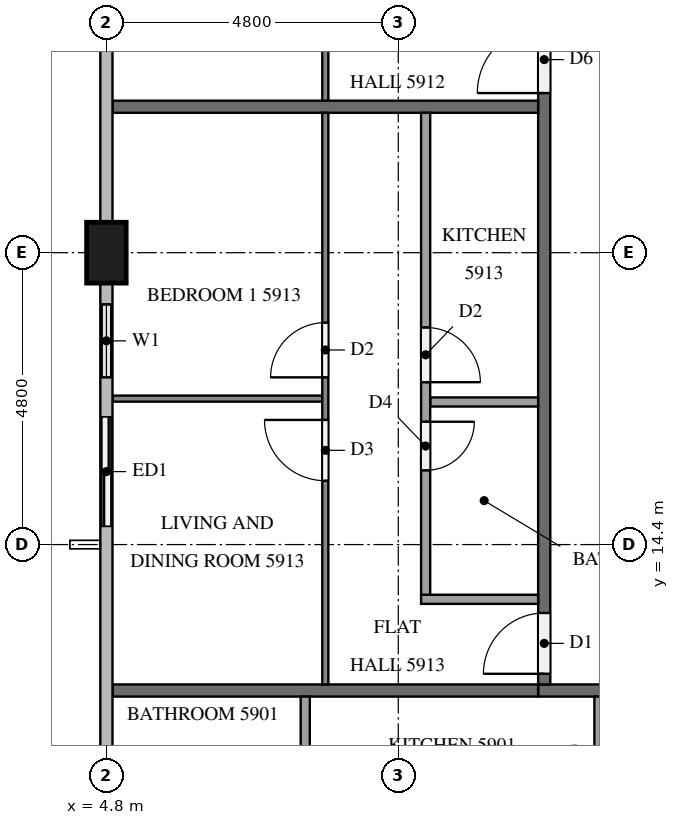
"""IFC4 building model, lengths in metres.
Left out: names, types, materials, properties, quantities, classifications, styles, units other than length and angle.
Written with IfcOpenShell. Run it as: python <this file> out.ifc"""

import sys

from ifc_helpers import new_model, si_unit, direction, frame, frame_2d, origin, origin_2d, place, context, subcontext, project, spatial, rectangle, extrude, element, fill, save


model = new_model("IFC4")
c1 = context("Model", 3, precision=1e-05, world=origin(), true_north=direction((0.0, 1.0)))
c2 = subcontext(c1, "Body", "Model", "MODEL_VIEW")
j1 = project(units=[si_unit("LENGTHUNIT", "METRE"), si_unit("PLANEANGLEUNIT", "RADIAN")], contexts=[c1])
p1 = place(None, origin())
s1 = spatial("IfcSite", under=j1, at=p1, CompositionType="ELEMENT")
p2 = place(p1, origin())
s2 = spatial("IfcBuilding", under=s1, at=p2, CompositionType="ELEMENT")
p3 = place(p2, frame((0.0, 0.0, 226.3)))
s3 = spatial("IfcBuildingStorey", under=s2, at=p3, CompositionType="ELEMENT", Elevation=226.3)
p4 = place(p3, frame((4.8, 19.2, 0.0), z_axis=(0.0, 0.0, 1.0), x_axis=(0.0, 1.0, 0.0)))
e1 = element("IfcColumn", 1, at=p4, inside=s3, PredefinedType="COLUMN", context=c2, shape_type="SweptSolid", body=[
    extrude(rectangle(XDim=1.0, YDim=0.65, at=origin_2d()), origin(), (0.0, 0.0, 1.0), 3.2),
])
p5 = place(p3, frame((4.8, 18.7, 0.0), z_axis=(0.0, 0.0, 1.0), x_axis=(0.0, -1.0, 0.0)))
e2 = element("IfcWall", 2, at=p5, inside=s3, PredefinedType="SOLIDWALL", context=c2, shape_type="SweptSolid", body=[
    extrude(rectangle(XDim=4.3, YDim=0.15, at=frame_2d((2.15, 0.0))), origin(), (0.0, 0.0, 1.0), 3.2),
])
p6 = place(p5, frame((0.35, 0.0, 0.9)))
e3 = element("IfcOpeningElement", 3, at=p6, cuts=e2, PredefinedType="OPENING", context=c2, shape_type="SweptSolid", body=[
    extrude(rectangle(XDim=1.2, YDim=1.4, at=frame_2d((0.6, 0.7))), frame((0.0, 0.085, 0.0), z_axis=(0.0, -1.0, 0.0), x_axis=(1.0, 0.0, 0.0)), (0.0, 0.0, 1.0), 0.17),
])
p7 = place(p5, frame((2.2, 0.0, 0.0)))
e4 = element("IfcOpeningElement", 4, at=p7, cuts=e2, PredefinedType="OPENING", context=c2, shape_type="SweptSolid", body=[
    extrude(rectangle(XDim=1.8, YDim=2.4, at=frame_2d((0.9, 1.2))), frame((0.0, 0.085, 0.0), z_axis=(0.0, -1.0, 0.0), x_axis=(1.0, 0.0, 0.0)), (0.0, 0.0, 1.0), 0.17),
])
p8 = place(p3, frame((50.5, 12.0, 0.0), z_axis=(0.0, 0.0, 1.0), x_axis=(-1.0, 0.0, 0.0)))
e5 = element("IfcWall", 5, at=p8, inside=s3, PredefinedType="PARTITIONING", context=c2, shape_type="SweptSolid", body=[
    extrude(rectangle(XDim=38.6, YDim=0.2, at=frame_2d((19.3, 0.0))), origin(), (0.0, 0.0, 1.0), 3.2),
])
p9 = place(p8, frame((36.375, 0.0, 0.0)))
e6 = element("IfcOpeningElement", 6, at=p9, cuts=e5, PredefinedType="OPENING", context=c2, shape_type="SweptSolid", body=[
    extrude(rectangle(XDim=1.0, YDim=2.1, at=frame_2d((0.5, 1.05))), frame((0.0, 0.11, 0.0), z_axis=(0.0, -1.0, 0.0), x_axis=(1.0, 0.0, 0.0)), (0.0, 0.0, 1.0), 0.22),
])
p10 = place(p8, frame((34.825, 0.0, 0.0)))
e7 = element("IfcOpeningElement", 7, at=p10, cuts=e5, PredefinedType="OPENING", context=c2, shape_type="SweptSolid", body=[
    extrude(rectangle(XDim=1.0, YDim=2.1, at=frame_2d((0.5, 1.05))), frame((0.0, 0.11, 0.0), z_axis=(0.0, -1.0, 0.0), x_axis=(1.0, 0.0, 0.0)), (0.0, 0.0, 1.0), 0.22),
])
p11 = place(p8, frame((20.375, 0.0, 0.0)))
e8 = element("IfcOpeningElement", 8, at=p11, cuts=e5, PredefinedType="OPENING", context=c2, shape_type="SweptSolid", body=[
    extrude(rectangle(XDim=1.1, YDim=2.1, at=frame_2d((0.55, 1.05))), frame((0.0, 0.11, 0.0), z_axis=(0.0, -1.0, 0.0), x_axis=(1.0, 0.0, 0.0)), (0.0, 0.0, 1.0), 0.22),
])
p12 = place(p8, frame((1.225, 0.0, 0.0)))
e9 = element("IfcOpeningElement", 9, at=p12, cuts=e5, PredefinedType="OPENING", context=c2, shape_type="SweptSolid", body=[
    extrude(rectangle(XDim=1.0, YDim=2.1, at=frame_2d((0.5, 1.05))), frame((0.0, 0.11, 0.0), z_axis=(0.0, -1.0, 0.0), x_axis=(1.0, 0.0, 0.0)), (0.0, 0.0, 1.0), 0.22),
])
p13 = place(p3, frame((12.0, 12.1, 0.0), z_axis=(0.0, 0.0, 1.0), x_axis=(0.0, 1.0, 0.0)))
e10 = element("IfcWall", 10, at=p13, inside=s3, PredefinedType="PARTITIONING", context=c2, shape_type="SweptSolid", body=[
    extrude(rectangle(XDim=28.6, YDim=0.2, at=frame_2d((14.3, 0.0))), origin(), (0.0, 0.0, 1.0), 3.2),
])
p14 = place(p13, frame((9.725, 0.0, 0.0)))
e11 = element("IfcOpeningElement", 11, at=p14, cuts=e10, PredefinedType="OPENING", context=c2, shape_type="SweptSolid", body=[
    extrude(rectangle(XDim=1.1, YDim=2.1, at=frame_2d((0.55, 1.05))), frame((0.0, 0.11, 0.0), z_axis=(0.0, -1.0, 0.0), x_axis=(1.0, 0.0, 0.0)), (0.0, 0.0, 1.0), 0.22),
])
p15 = place(p13, frame((0.175, 0.0, 0.0)))
e12 = element("IfcOpeningElement", 12, at=p15, cuts=e10, PredefinedType="OPENING", context=c2, shape_type="SweptSolid", body=[
    extrude(rectangle(XDim=1.0, YDim=2.1, at=frame_2d((0.5, 1.05))), frame((0.0, 0.11, 0.0), z_axis=(0.0, -1.0, 0.0), x_axis=(1.0, 0.0, 0.0)), (0.0, 0.0, 1.0), 0.22),
])
for number, where, z_axis, x_axis in (
    (13, (4.9, 12.0, 0.0), (0.0, 0.0, 1.0), (1.0, 0.0, 0.0)),
    (14, (4.9, 21.6, 0.0), (0.0, 0.0, 1.0), (1.0, 0.0, 0.0)),
):
    element("IfcWall", number, at=place(p3, frame(where, z_axis=z_axis, x_axis=x_axis)), inside=s3, PredefinedType="PARTITIONING", context=c2, shape_type="SweptSolid", body=[
        extrude(rectangle(XDim=7.0, YDim=0.2, at=frame_2d((3.5, 0.0))), origin(), (0.0, 0.0, 1.0), 3.2),
    ])
p16 = place(p3, frame((8.07, 11.9, 0.0), z_axis=(0.0, 0.0, 1.0), x_axis=(0.0, -1.0, 0.0)))
e15 = element("IfcWall", 15, at=p16, inside=s3, PredefinedType="PARTITIONING", context=c2, shape_type="SweptSolid", body=[
    extrude(rectangle(XDim=1.625, YDim=0.15, at=frame_2d((0.812, 0.0))), origin(), (0.0, 0.0, 1.0), 3.2),
])
p17 = place(p3, frame((12.9, 11.9, 0.0), z_axis=(0.0, 0.0, 1.0), x_axis=(0.0, -1.0, 0.0)))
e16 = element("IfcWall", 16, at=p17, inside=s3, PredefinedType="PARTITIONING", context=c2, shape_type="SweptSolid", body=[
    extrude(rectangle(XDim=1.775, YDim=0.15, at=frame_2d((0.887, 0.0))), origin(), (0.0, 0.0, 1.0), 3.2),
])
p18 = place(p3, frame((8.4, 21.7, 0.0), z_axis=(0.0, 0.0, 1.0), x_axis=(0.0, 1.0, 0.0)))
e17 = element("IfcWall", 17, at=p18, inside=s3, PredefinedType="PARTITIONING", context=c2, shape_type="SweptSolid", body=[
    extrude(rectangle(XDim=19.0, YDim=0.1, at=frame_2d((9.5, 0.0))), origin(), (0.0, 0.0, 1.0), 3.2),
])
p19 = place(p18, frame((3.45, 0.0, 0.0)))
e18 = element("IfcOpeningElement", 18, at=p19, cuts=e17, PredefinedType="OPENING", context=c2, shape_type="SweptSolid", body=[
    extrude(rectangle(XDim=0.9, YDim=2.1, at=frame_2d((0.45, 1.05))), frame((0.0, 0.06, 0.0), z_axis=(0.0, -1.0, 0.0), x_axis=(1.0, 0.0, 0.0)), (0.0, 0.0, 1.0), 0.12),
])
p20 = place(p18, frame((5.05, 0.0, 0.0)))
e19 = element("IfcOpeningElement", 19, at=p20, cuts=e17, PredefinedType="OPENING", context=c2, shape_type="SweptSolid", body=[
    extrude(rectangle(XDim=0.9, YDim=2.1, at=frame_2d((0.45, 1.05))), frame((0.0, 0.06, 0.0), z_axis=(0.0, -1.0, 0.0), x_axis=(1.0, 0.0, 0.0)), (0.0, 0.0, 1.0), 0.12),
])
p21 = place(p18, frame((13.05, 0.0, 0.0)))
e20 = element("IfcOpeningElement", 20, at=p21, cuts=e17, PredefinedType="OPENING", context=c2, shape_type="SweptSolid", body=[
    extrude(rectangle(XDim=0.9, YDim=2.1, at=frame_2d((0.45, 1.05))), frame((0.0, 0.06, 0.0), z_axis=(0.0, -1.0, 0.0), x_axis=(1.0, 0.0, 0.0)), (0.0, 0.0, 1.0), 0.12),
])
p22 = place(p18, frame((14.65, 0.0, 0.0)))
e21 = element("IfcOpeningElement", 21, at=p22, cuts=e17, PredefinedType="OPENING", context=c2, shape_type="SweptSolid", body=[
    extrude(rectangle(XDim=1.0, YDim=2.1, at=frame_2d((0.5, 1.05))), frame((0.0, 0.06, 0.0), z_axis=(0.0, -1.0, 0.0), x_axis=(1.0, 0.0, 0.0)), (0.0, 0.0, 1.0), 0.12),
])
p23 = place(p3, frame((8.35, 16.8, 0.0), z_axis=(0.0, 0.0, 1.0), x_axis=(-1.0, 0.0, 0.0)))
e22 = element("IfcWall", 22, at=p23, inside=s3, PredefinedType="PARTITIONING", context=c2, shape_type="SweptSolid", body=[
    extrude(rectangle(XDim=3.45, YDim=0.1, at=frame_2d((1.725, 0.0))), origin(), (0.0, 0.0, 1.0), 3.2),
])
p24 = place(p3, frame((8.4, 12.1, 0.0), z_axis=(0.0, 0.0, 1.0), x_axis=(0.0, 1.0, 0.0)))
e23 = element("IfcWall", 23, at=p24, inside=s3, PredefinedType="PARTITIONING", context=c2, shape_type="SweptSolid", body=[
    extrude(rectangle(XDim=9.4, YDim=0.1, at=frame_2d((4.7, 0.0))), origin(), (0.0, 0.0, 1.0), 3.2),
])
p25 = place(p24, frame((3.35, 0.0, 0.0)))
e24 = element("IfcOpeningElement", 24, at=p25, cuts=e23, PredefinedType="OPENING", context=c2, shape_type="SweptSolid", body=[
    extrude(rectangle(XDim=1.0, YDim=2.1, at=frame_2d((0.5, 1.05))), frame((0.0, 0.06, 0.0), z_axis=(0.0, -1.0, 0.0), x_axis=(1.0, 0.0, 0.0)), (0.0, 0.0, 1.0), 0.12),
])
p26 = place(p24, frame((5.05, 0.0, 0.0)))
e25 = element("IfcOpeningElement", 25, at=p26, cuts=e23, PredefinedType="OPENING", context=c2, shape_type="SweptSolid", body=[
    extrude(rectangle(XDim=0.9, YDim=2.1, at=frame_2d((0.45, 1.05))), frame((0.0, 0.06, 0.0), z_axis=(0.0, -1.0, 0.0), x_axis=(1.0, 0.0, 0.0)), (0.0, 0.0, 1.0), 0.12),
])
p27 = place(p3, frame((11.9, 16.745, 0.0), z_axis=(0.0, 0.0, 1.0), x_axis=(-1.0, 0.0, 0.0)))
e26 = element("IfcWall", 26, at=p27, inside=s3, PredefinedType="PARTITIONING", context=c2, shape_type="SweptSolid", body=[
    extrude(rectangle(XDim=1.775, YDim=0.15, at=frame_2d((0.887, 0.0))), origin(), (0.0, 0.0, 1.0), 3.2),
])
p28 = place(p3, frame((11.9, 13.5, 0.0), z_axis=(0.0, 0.0, 1.0), x_axis=(-1.0, 0.0, 0.0)))
e27 = element("IfcWall", 27, at=p28, inside=s3, PredefinedType="PARTITIONING", context=c2, shape_type="SweptSolid", body=[
    extrude(rectangle(XDim=1.925, YDim=0.15, at=frame_2d((0.962, 0.0))), origin(), (0.0, 0.0, 1.0), 3.2),
])
p29 = place(p3, frame((10.05, 21.5, 0.0), z_axis=(0.0, 0.0, 1.0), x_axis=(0.0, -1.0, 0.0)))
e28 = element("IfcWall", 28, at=p29, inside=s3, PredefinedType="PARTITIONING", context=c2, shape_type="SweptSolid", body=[
    extrude(rectangle(XDim=7.925, YDim=0.15, at=frame_2d((3.962, 0.0))), origin(), (0.0, 0.0, 1.0), 3.2),
])
p30 = place(p29, frame((5.08, 0.0, 0.0)))
e29 = element("IfcOpeningElement", 29, at=p30, cuts=e28, PredefinedType="OPENING", context=c2, shape_type="SweptSolid", body=[
    extrude(rectangle(XDim=0.8, YDim=2.1, at=frame_2d((0.4, 1.05))), frame((0.0, 0.085, 0.0), z_axis=(0.0, -1.0, 0.0), x_axis=(1.0, 0.0, 0.0)), (0.0, 0.0, 1.0), 0.17),
])
p31 = place(p29, frame((3.53, 0.0, 0.0)))
e30 = element("IfcOpeningElement", 30, at=p31, cuts=e28, PredefinedType="OPENING", context=c2, shape_type="SweptSolid", body=[
    extrude(rectangle(XDim=0.9, YDim=2.1, at=frame_2d((0.45, 1.05))), frame((0.0, 0.085, 0.0), z_axis=(0.0, -1.0, 0.0), x_axis=(1.0, 0.0, 0.0)), (0.0, 0.0, 1.0), 0.17),
])
p32 = place(p6, origin())
e31 = element("IfcWindow", 31, at=p32, inside=s3, PartitioningType="SINGLE_PANEL", PredefinedType="WINDOW", context=c2, shape_type="SweptSolid", body=[
    extrude(rectangle(XDim=1.2, YDim=1.4, at=frame_2d((0.6, 0.7))), frame((0.0, 0.03, 0.0), z_axis=(0.0, -1.0, 0.0), x_axis=(1.0, 0.0, 0.0)), (0.0, 0.0, 1.0), 0.06),
])
fill(e3, e31)
p33 = place(p7, origin())
e32 = element("IfcDoor", 32, at=p33, inside=s3, OperationType="SLIDING_TO_LEFT", PredefinedType="DOOR", context=c2, shape_type="SweptSolid", body=[
    extrude(rectangle(XDim=1.8, YDim=2.4, at=frame_2d((0.9, 1.2))), frame((0.0, 0.025, 0.0), z_axis=(0.0, -1.0, 0.0), x_axis=(1.0, 0.0, 0.0)), (0.0, 0.0, 1.0), 0.05),
])
fill(e4, e32)
p34 = place(p14, origin())
e33 = element("IfcDoor", 33, at=p34, inside=s3, OperationType="SINGLE_SWING_LEFT", PredefinedType="DOOR", context=c2, shape_type="SweptSolid", body=[
    extrude(rectangle(XDim=1.1, YDim=2.1, at=frame_2d((0.55, 1.05))), frame((0.0, 0.025, 0.0), z_axis=(0.0, -1.0, 0.0), x_axis=(1.0, 0.0, 0.0)), (0.0, 0.0, 1.0), 0.05),
])
fill(e11, e33)
p35 = place(p15, origin())
e34 = element("IfcDoor", 34, at=p35, inside=s3, OperationType="SINGLE_SWING_LEFT", PredefinedType="DOOR", context=c2, shape_type="SweptSolid", body=[
    extrude(rectangle(XDim=1.0, YDim=2.1, at=frame_2d((0.5, 1.05))), frame((0.0, 0.025, 0.0), z_axis=(0.0, -1.0, 0.0), x_axis=(1.0, 0.0, 0.0)), (0.0, 0.0, 1.0), 0.05),
])
fill(e12, e34)
p36 = place(p25, origin())
e35 = element("IfcDoor", 35, at=p36, inside=s3, OperationType="SINGLE_SWING_RIGHT", PredefinedType="DOOR", context=c2, shape_type="SweptSolid", body=[
    extrude(rectangle(XDim=1.0, YDim=2.1, at=frame_2d((0.5, 1.05))), frame((0.0, 0.025, 0.0), z_axis=(0.0, -1.0, 0.0), x_axis=(1.0, 0.0, 0.0)), (0.0, 0.0, 1.0), 0.05),
])
fill(e24, e35)
p37 = place(p26, origin())
e36 = element("IfcDoor", 36, at=p37, inside=s3, OperationType="SINGLE_SWING_LEFT", PredefinedType="DOOR", context=c2, shape_type="SweptSolid", body=[
    extrude(rectangle(XDim=0.9, YDim=2.1, at=frame_2d((0.45, 1.05))), frame((0.0, 0.025, 0.0), z_axis=(0.0, -1.0, 0.0), x_axis=(1.0, 0.0, 0.0)), (0.0, 0.0, 1.0), 0.05),
])
fill(e25, e36)
p38 = place(p30, origin())
e37 = element("IfcDoor", 37, at=p38, inside=s3, OperationType="SINGLE_SWING_LEFT", PredefinedType="DOOR", context=c2, shape_type="SweptSolid", body=[
    extrude(rectangle(XDim=0.8, YDim=2.1, at=frame_2d((0.4, 1.05))), frame((0.0, 0.025, 0.0), z_axis=(0.0, -1.0, 0.0), x_axis=(1.0, 0.0, 0.0)), (0.0, 0.0, 1.0), 0.05),
])
fill(e29, e37)
p39 = place(p31, origin())
e38 = element("IfcDoor", 38, at=p39, inside=s3, OperationType="SINGLE_SWING_RIGHT", PredefinedType="DOOR", context=c2, shape_type="SweptSolid", body=[
    extrude(rectangle(XDim=0.9, YDim=2.1, at=frame_2d((0.45, 1.05))), frame((0.0, 0.025, 0.0), z_axis=(0.0, -1.0, 0.0), x_axis=(1.0, 0.0, 0.0)), (0.0, 0.0, 1.0), 0.05),
])
fill(e30, e38)
save(model, sys.argv[1])
